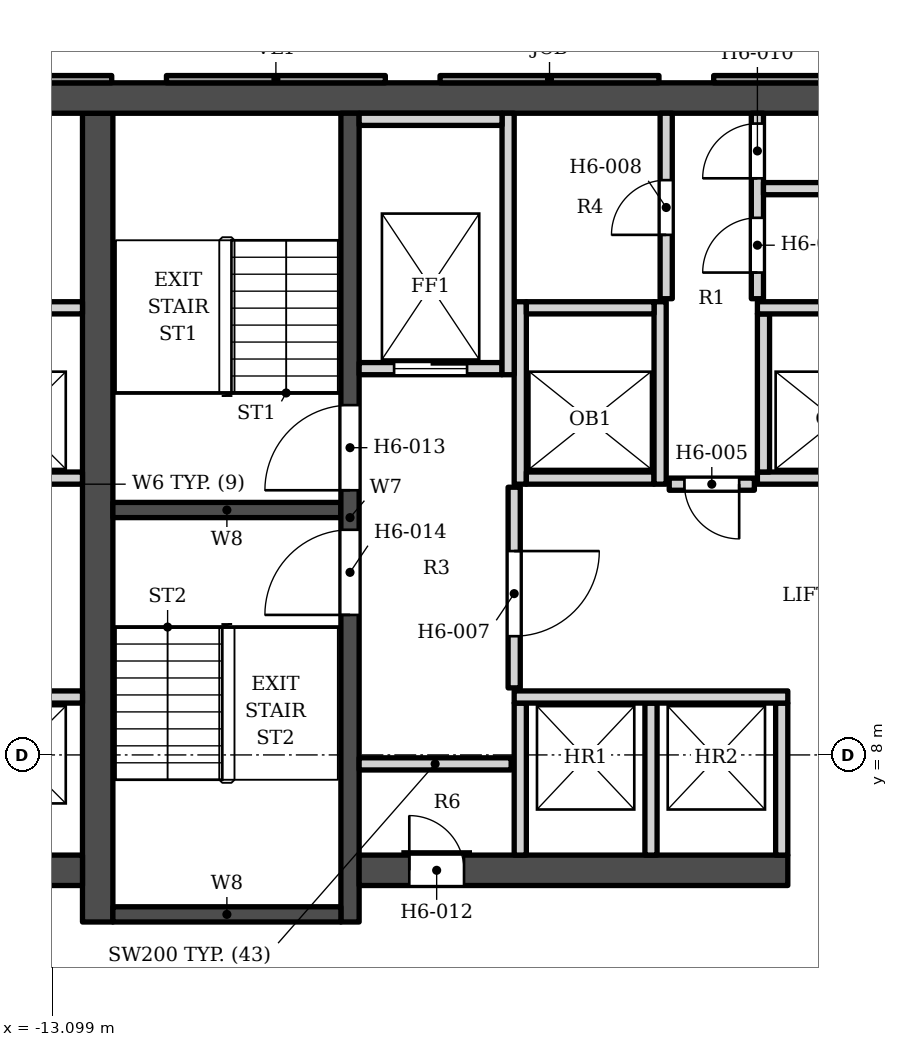
"""IFC4 building model, lengths in metres.
Left out: names, types, materials, properties, quantities, classifications, styles, units other than length and angle.
Written with IfcOpenShell. Run it as: python <this file> out.ifc"""

import sys

from ifc_helpers import new_model, si_unit, direction, frame, frame_2d, origin, place, context, subcontext, project, spatial, polyline, rectangle, outline, extrude, element, fill, save


model = new_model("IFC4")
c1 = context("Model", 3, precision=1e-05, world=origin(), true_north=direction((0.0, 1.0)))
c2 = subcontext(c1, "Body", "Model", "MODEL_VIEW")
j1 = project(units=[si_unit("LENGTHUNIT", "METRE"), si_unit("PLANEANGLEUNIT", "RADIAN")], contexts=[c1])
p1 = place(None, origin())
s1 = spatial("IfcSite", under=j1, at=p1, CompositionType="ELEMENT")
p2 = place(p1, origin())
s2 = spatial("IfcBuilding", under=s1, at=p2, CompositionType="ELEMENT")
p3 = place(p2, frame((0.0, 0.0, 102.0)))
s3 = spatial("IfcBuildingStorey", under=s2, at=p3, CompositionType="ELEMENT", Elevation=102.0)
p4 = place(p3, frame((-16.9, 18.802, 0.0), z_axis=(0.0, 0.0, 1.0), x_axis=(1.0, 0.0, 0.0)))
e1 = element("IfcWall", 1, at=p4, inside=s3, PredefinedType="SHEAR", context=c2, shape_type="SweptSolid", body=[
    extrude(rectangle(XDim=33.8, YDim=0.5, at=frame_2d((16.9, 0.0))), origin(), (0.0, 0.0, 1.0), 3.4),
])
p5 = place(p3, frame((-12.35, 5.253, 0.0), z_axis=(0.0, 0.0, 1.0), x_axis=(0.0, 1.0, 0.0)))
e2 = element("IfcWall", 2, at=p5, inside=s3, PredefinedType="SHEAR", context=c2, shape_type="SweptSolid", body=[
    extrude(rectangle(XDim=13.3, YDim=0.5, at=frame_2d((6.65, 0.0))), origin(), (0.0, 0.0, 1.0), 3.4),
])
p6 = place(p3, frame((-8.2, 5.253, 0.0), z_axis=(0.0, 0.0, 1.0), x_axis=(0.0, 1.0, 0.0)))
e3 = element("IfcWall", 3, at=p6, inside=s3, PredefinedType="SHEAR", context=c2, shape_type="SweptSolid", body=[
    extrude(rectangle(XDim=13.3, YDim=0.3, at=frame_2d((6.65, 0.0))), origin(), (0.0, 0.0, 1.0), 3.4),
])
p7 = place(p6, frame((7.1, 0.0, 0.0)))
e4 = element("IfcOpeningElement", 4, at=p7, cuts=e3, PredefinedType="OPENING", context=c2, shape_type="SweptSolid", body=[
    extrude(rectangle(XDim=1.4, YDim=2.1, at=frame_2d((0.7, 1.05))), frame((0.0, 0.16, 0.0), z_axis=(0.0, -1.0, 0.0), x_axis=(1.0, 0.0, 0.0)), (0.0, 0.0, 1.0), 0.32),
])
p8 = place(p6, frame((5.05, 0.0, 0.0)))
e5 = element("IfcOpeningElement", 5, at=p8, cuts=e3, PredefinedType="OPENING", context=c2, shape_type="SweptSolid", body=[
    extrude(rectangle(XDim=1.4, YDim=2.1, at=frame_2d((0.7, 1.05))), frame((0.0, 0.16, 0.0), z_axis=(0.0, -1.0, 0.0), x_axis=(1.0, 0.0, 0.0)), (0.0, 0.0, 1.0), 0.32),
])
for number, where, z_axis, x_axis in (
    (6, (-12.1, 12.028, 0.0), (0.0, 0.0, 1.0), (1.0, 0.0, 0.0)),
    (7, (-12.1, 5.378, 0.0), (0.0, 0.0, 1.0), (1.0, 0.0, 0.0)),
):
    element("IfcWall", number, at=place(p3, frame(where, z_axis=z_axis, x_axis=x_axis)), inside=s3, PredefinedType="SHEAR", context=c2, shape_type="SweptSolid", body=[
        extrude(rectangle(XDim=3.75, YDim=0.25, at=frame_2d((1.875, 0.0))), origin(), (0.0, 0.0, 1.0), 3.4),
    ])
p9 = place(p3, frame((-8.05, 6.103, 0.0), z_axis=(0.0, 0.0, 1.0), x_axis=(1.0, 0.0, 0.0)))
e8 = element("IfcWall", 8, at=p9, inside=s3, PredefinedType="SHEAR", context=c2, shape_type="SweptSolid", body=[
    extrude(rectangle(XDim=7.05, YDim=0.5, at=frame_2d((3.525, 0.0))), origin(), (0.0, 0.0, 1.0), 3.4),
])
p10 = place(p9, frame((0.825, 0.0, 0.0)))
e9 = element("IfcOpeningElement", 9, at=p10, cuts=e8, PredefinedType="OPENING", context=c2, shape_type="SweptSolid", body=[
    extrude(rectangle(XDim=0.9, YDim=2.1, at=frame_2d((0.45, 1.05))), frame((0.0, 0.26, 0.0), z_axis=(0.0, -1.0, 0.0), x_axis=(1.0, 0.0, 0.0)), (0.0, 0.0, 1.0), 0.52),
])
p11 = place(p3, frame((-12.6, 6.103, 0.0), z_axis=(0.0, 0.0, 1.0), x_axis=(-1.0, 0.0, 0.0)))
e10 = element("IfcWall", 10, at=p11, inside=s3, PredefinedType="SHEAR", context=c2, shape_type="SweptSolid", body=[
    extrude(rectangle(XDim=4.3, YDim=0.5, at=frame_2d((2.15, 0.0))), origin(), (0.0, 0.0, 1.0), 3.4),
])
p12 = place(p3, origin())
e11 = element("IfcWall", 11, at=p12, inside=s3, PredefinedType="ELEMENTEDWALL", context=c2, shape_type="SweptSolid", body=[
    extrude(outline(polyline([(-2.219, 19.173), (-2.219, 19.052), (1.381, 19.052), (1.381, 19.173), (-2.219, 19.173)])), origin(), (0.0, 0.0, 1.0), 2.65),
])
p13 = place(p3, origin())
e12 = element("IfcWall", 12, at=p13, inside=s3, PredefinedType="SOLIDWALL", context=c2, shape_type="SweptSolid", body=[
    extrude(outline(polyline([(-6.719, 19.173), (-6.719, 19.052), (-3.119, 19.052), (-3.119, 19.173), (-6.719, 19.173)])), origin(), (0.0, 0.0, 1.0), 2.65),
])
p14 = place(p3, origin())
e13 = element("IfcWall", 13, at=p14, inside=s3, PredefinedType="ELEMENTEDWALL", context=c2, shape_type="SweptSolid", body=[
    extrude(outline(polyline([(-11.219, 19.173), (-11.219, 19.052), (-7.619, 19.052), (-7.619, 19.173), (-11.219, 19.173)])), origin(), (0.0, 0.0, 1.0), 2.65),
])
p15 = place(p3, origin())
e14 = element("IfcWall", 14, at=p15, inside=s3, PredefinedType="SOLIDWALL", context=c2, shape_type="SweptSolid", body=[
    extrude(outline(polyline([(-15.719, 19.173), (-15.719, 19.052), (-12.119, 19.052), (-12.119, 19.173), (-15.719, 19.173)])), origin(), (0.0, 0.0, 1.0), 2.65),
])
for number, where, z_axis, x_axis in (
    (15, (-5.4, 6.353, 0.0), (0.0, 0.0, 1.0), (0.0, 1.0, 0.0)),
    (16, (-3.25, 6.353, 0.0), (0.0, 0.0, 1.0), (0.0, 1.0, 0.0)),
    (17, (-1.1, 6.353, 0.0), (0.0, 0.0, 1.0), (0.0, 1.0, 0.0)),
    (18, (-8.05, 7.853, 0.0), (0.0, 0.0, 1.0), (1.0, 0.0, 0.0)),
):
    element("IfcWall", number, at=place(p3, frame(where, z_axis=z_axis, x_axis=x_axis)), inside=s3, PredefinedType="SOLIDWALL", context=c2, shape_type="SweptSolid", body=[
        extrude(rectangle(XDim=2.5, YDim=0.2, at=frame_2d((1.25, 0.0))), origin(), (0.0, 0.0, 1.0), 3.23),
    ])
p16 = place(p3, frame((-16.9, 8.953, 0.0), z_axis=(0.0, 0.0, 1.0), x_axis=(1.0, 0.0, 0.0)))
e19 = element("IfcWall", 19, at=p16, inside=s3, PredefinedType="SOLIDWALL", context=c2, shape_type="SweptSolid", body=[
    extrude(rectangle(XDim=4.3, YDim=0.2, at=frame_2d((2.15, 0.0))), origin(), (0.0, 0.0, 1.0), 3.23),
])
p17 = place(p16, frame((2.675, 0.0, 0.0)))
e20 = element("IfcOpeningElement", 20, at=p17, cuts=e19, PredefinedType="OPENING", context=c2, shape_type="SweptSolid", body=[
    extrude(rectangle(XDim=1.1, YDim=2.1, at=frame_2d((0.55, 1.05))), frame((0.0, 0.11, 0.0), z_axis=(0.0, -1.0, 0.0), x_axis=(1.0, 0.0, 0.0)), (0.0, 0.0, 1.0), 0.22),
])
p18 = place(p16, frame((0.425, 0.0, 0.0)))
e21 = element("IfcOpeningElement", 21, at=p18, cuts=e19, PredefinedType="OPENING", context=c2, shape_type="SweptSolid", body=[
    extrude(rectangle(XDim=1.1, YDim=2.1, at=frame_2d((0.55, 1.05))), frame((0.0, 0.11, 0.0), z_axis=(0.0, -1.0, 0.0), x_axis=(1.0, 0.0, 0.0)), (0.0, 0.0, 1.0), 0.22),
])
p19 = place(p3, frame((-5.5, 8.953, 0.0), z_axis=(0.0, 0.0, 1.0), x_axis=(1.0, 0.0, 0.0)))
e22 = element("IfcWall", 22, at=p19, inside=s3, PredefinedType="SOLIDWALL", context=c2, shape_type="SweptSolid", body=[
    extrude(rectangle(XDim=4.5, YDim=0.2, at=frame_2d((2.25, 0.0))), origin(), (0.0, 0.0, 1.0), 3.23),
])
p20 = place(p3, frame((-5.5, 9.103, 0.0), z_axis=(0.0, 0.0, 1.0), x_axis=(0.0, 1.0, 0.0)))
e23 = element("IfcWall", 23, at=p20, inside=s3, PredefinedType="SOLIDWALL", context=c2, shape_type="SweptSolid", body=[
    extrude(rectangle(XDim=3.3, YDim=0.2, at=frame_2d((1.65, 0.0))), origin(), (0.0, 0.0, 1.0), 3.23),
])
p21 = place(p20, frame((0.85, 0.0, 0.0)))
e24 = element("IfcOpeningElement", 24, at=p21, cuts=e23, PredefinedType="OPENING", context=c2, shape_type="SweptSolid", body=[
    extrude(rectangle(XDim=1.4, YDim=2.1, at=frame_2d((0.7, 1.05))), frame((0.0, 0.11, 0.0), z_axis=(0.0, -1.0, 0.0), x_axis=(1.0, 0.0, 0.0)), (0.0, 0.0, 1.0), 0.22),
])
p22 = place(p3, frame((-2.95, 12.453, 0.0), z_axis=(0.0, 0.0, 1.0), x_axis=(1.0, 0.0, 0.0)))
e25 = element("IfcWall", 25, at=p22, inside=s3, PredefinedType="SOLIDWALL", context=c2, shape_type="SweptSolid", body=[
    extrude(rectangle(XDim=1.4, YDim=0.2, at=frame_2d((0.7, 0.0))), origin(), (0.0, 0.0, 1.0), 3.23),
])
p23 = place(p22, frame((0.25, 0.0, 0.0)))
e26 = element("IfcOpeningElement", 26, at=p23, cuts=e25, PredefinedType="OPENING", context=c2, shape_type="SweptSolid", body=[
    extrude(rectangle(XDim=0.9, YDim=2.1, at=frame_2d((0.45, 1.05))), frame((0.0, 0.11, 0.0), z_axis=(0.0, -1.0, 0.0), x_axis=(1.0, 0.0, 0.0)), (0.0, 0.0, 1.0), 0.22),
])
p24 = place(p3, frame((-16.9, 12.552, 0.0), z_axis=(0.0, 0.0, 1.0), x_axis=(1.0, 0.0, 0.0)))
e27 = element("IfcWall", 27, at=p24, inside=s3, PredefinedType="SOLIDWALL", context=c2, shape_type="SweptSolid", body=[
    extrude(rectangle(XDim=4.3, YDim=0.2, at=frame_2d((2.15, 0.0))), origin(), (0.0, 0.0, 1.0), 3.23),
])
p25 = place(p24, frame((2.675, 0.0, 0.0)))
e28 = element("IfcOpeningElement", 28, at=p25, cuts=e27, PredefinedType="OPENING", context=c2, shape_type="SweptSolid", body=[
    extrude(rectangle(XDim=1.1, YDim=2.1, at=frame_2d((0.55, 1.05))), frame((0.0, 0.11, 0.0), z_axis=(0.0, -1.0, 0.0), x_axis=(1.0, 0.0, 0.0)), (0.0, 0.0, 1.0), 0.22),
])
p26 = place(p24, frame((0.425, 0.0, 0.0)))
e29 = element("IfcOpeningElement", 29, at=p26, cuts=e27, PredefinedType="OPENING", context=c2, shape_type="SweptSolid", body=[
    extrude(rectangle(XDim=1.1, YDim=2.1, at=frame_2d((0.55, 1.05))), frame((0.0, 0.11, 0.0), z_axis=(0.0, -1.0, 0.0), x_axis=(1.0, 0.0, 0.0)), (0.0, 0.0, 1.0), 0.22),
])
p27 = place(p3, frame((-5.4, 12.453, 0.0), z_axis=(0.0, 0.0, 1.0), x_axis=(0.0, 1.0, 0.0)))
e30 = element("IfcWall", 30, at=p27, inside=s3, PredefinedType="SOLIDWALL", context=c2, shape_type="SweptSolid", body=[
    extrude(rectangle(XDim=3.0, YDim=0.2, at=frame_2d((1.5, 0.0))), origin(), (0.0, 0.0, 1.0), 3.23),
])
p28 = place(p3, frame((-5.3, 12.552, 0.0), z_axis=(0.0, 0.0, 1.0), x_axis=(1.0, 0.0, 0.0)))
e31 = element("IfcWall", 31, at=p28, inside=s3, PredefinedType="SOLIDWALL", context=c2, shape_type="SweptSolid", body=[
    extrude(rectangle(XDim=2.1, YDim=0.2, at=frame_2d((1.05, 0.0))), origin(), (0.0, 0.0, 1.0), 3.23),
])
p29 = place(p3, frame((-3.1, 12.453, 0.0), z_axis=(0.0, 0.0, 1.0), x_axis=(0.0, 1.0, 0.0)))
e32 = element("IfcWall", 32, at=p29, inside=s3, PredefinedType="SOLIDWALL", context=c2, shape_type="SweptSolid", body=[
    extrude(rectangle(XDim=3.0, YDim=0.2, at=frame_2d((1.5, 0.0))), origin(), (0.0, 0.0, 1.0), 3.23),
])
p30 = place(p3, frame((-1.5, 12.552, 0.0), z_axis=(0.0, 0.0, 1.0), x_axis=(1.0, 0.0, 0.0)))
e33 = element("IfcWall", 33, at=p30, inside=s3, PredefinedType="SOLIDWALL", context=c2, shape_type="SweptSolid", body=[
    extrude(rectangle(XDim=7.0, YDim=0.2, at=frame_2d((3.5, 0.0))), origin(), (0.0, 0.0, 1.0), 3.23),
])
p31 = place(p3, frame((-1.4, 12.653, 0.0), z_axis=(0.0, 0.0, 1.0), x_axis=(0.0, 1.0, 0.0)))
e34 = element("IfcWall", 34, at=p31, inside=s3, PredefinedType="SOLIDWALL", context=c2, shape_type="SweptSolid", body=[
    extrude(rectangle(XDim=2.6, YDim=0.2, at=frame_2d((1.3, 0.0))), origin(), (0.0, 0.0, 1.0), 3.23),
])
p32 = place(p3, frame((-8.05, 14.353, 0.0), z_axis=(0.0, 0.0, 1.0), x_axis=(1.0, 0.0, 0.0)))
e35 = element("IfcWall", 35, at=p32, inside=s3, PredefinedType="SOLIDWALL", context=c2, shape_type="SweptSolid", body=[
    extrude(rectangle(XDim=2.35, YDim=0.2, at=frame_2d((1.175, 0.0))), origin(), (0.0, 0.0, 1.0), 3.23),
])
p33 = place(p32, frame((0.575, 0.0, 0.0)))
e36 = element("IfcOpeningElement", 36, at=p33, cuts=e35, PredefinedType="OPENING", context=c2, shape_type="SweptSolid", body=[
    extrude(rectangle(XDim=1.2, YDim=2.1, at=frame_2d((0.6, 1.05))), frame((0.0, 0.11, 0.0), z_axis=(0.0, -1.0, 0.0), x_axis=(1.0, 0.0, 0.0)), (0.0, 0.0, 1.0), 0.22),
])
for number, where, z_axis, x_axis in (
    (37, (-5.6, 14.253, 0.0), (0.0, 0.0, 1.0), (0.0, 1.0, 0.0)),
    (38, (-16.9, 15.353, 0.0), (0.0, 0.0, 1.0), (1.0, 0.0, 0.0)),
):
    element("IfcWall", number, at=place(p3, frame(where, z_axis=z_axis, x_axis=x_axis)), inside=s3, PredefinedType="SOLIDWALL", context=c2, shape_type="SweptSolid", body=[
        extrude(rectangle(XDim=4.3, YDim=0.2, at=frame_2d((2.15, 0.0))), origin(), (0.0, 0.0, 1.0), 3.23),
    ])
p34 = place(p3, frame((-5.3, 15.353, 0.0), z_axis=(0.0, 0.0, 1.0), x_axis=(1.0, 0.0, 0.0)))
e39 = element("IfcWall", 39, at=p34, inside=s3, PredefinedType="SOLIDWALL", context=c2, shape_type="SweptSolid", body=[
    extrude(rectangle(XDim=2.1, YDim=0.2, at=frame_2d((1.05, 0.0))), origin(), (0.0, 0.0, 1.0), 3.23),
])
p35 = place(p3, frame((-1.5, 15.353, 0.0), z_axis=(0.0, 0.0, 1.0), x_axis=(1.0, 0.0, 0.0)))
e40 = element("IfcWall", 40, at=p35, inside=s3, PredefinedType="SOLIDWALL", context=c2, shape_type="SweptSolid", body=[
    extrude(rectangle(XDim=7.2, YDim=0.2, at=frame_2d((3.6, 0.0))), origin(), (0.0, 0.0, 1.0), 3.23),
])
p36 = place(p3, frame((-3.0, 15.503, 0.0), z_axis=(0.0, 0.0, 1.0), x_axis=(0.0, 1.0, 0.0)))
e41 = element("IfcWall", 41, at=p36, inside=s3, PredefinedType="SOLIDWALL", context=c2, shape_type="SweptSolid", body=[
    extrude(rectangle(XDim=3.05, YDim=0.2, at=frame_2d((1.525, 0.0))), origin(), (0.0, 0.0, 1.0), 3.23),
])
p37 = place(p36, frame((1.05, 0.0, 0.0)))
e42 = element("IfcOpeningElement", 42, at=p37, cuts=e41, PredefinedType="OPENING", context=c2, shape_type="SweptSolid", body=[
    extrude(rectangle(XDim=0.9, YDim=2.1, at=frame_2d((0.45, 1.05))), frame((0.0, 0.11, 0.0), z_axis=(0.0, -1.0, 0.0), x_axis=(1.0, 0.0, 0.0)), (0.0, 0.0, 1.0), 0.22),
])
p38 = place(p3, frame((-1.5, 15.503, 0.0), z_axis=(0.0, 0.0, 1.0), x_axis=(0.0, 1.0, 0.0)))
e43 = element("IfcWall", 43, at=p38, inside=s3, PredefinedType="SOLIDWALL", context=c2, shape_type="SweptSolid", body=[
    extrude(rectangle(XDim=3.05, YDim=0.2, at=frame_2d((1.525, 0.0))), origin(), (0.0, 0.0, 1.0), 3.23),
])
p39 = place(p38, frame((0.43, 0.0, 0.0)))
e44 = element("IfcOpeningElement", 44, at=p39, cuts=e43, PredefinedType="OPENING", context=c2, shape_type="SweptSolid", body=[
    extrude(rectangle(XDim=0.9, YDim=2.1, at=frame_2d((0.45, 1.05))), frame((0.0, 0.11, 0.0), z_axis=(0.0, -1.0, 0.0), x_axis=(1.0, 0.0, 0.0)), (0.0, 0.0, 1.0), 0.22),
])
p40 = place(p38, frame((1.98, 0.0, 0.0)))
e45 = element("IfcOpeningElement", 45, at=p40, cuts=e43, PredefinedType="OPENING", context=c2, shape_type="SweptSolid", body=[
    extrude(rectangle(XDim=0.9, YDim=2.1, at=frame_2d((0.45, 1.05))), frame((0.0, 0.11, 0.0), z_axis=(0.0, -1.0, 0.0), x_axis=(1.0, 0.0, 0.0)), (0.0, 0.0, 1.0), 0.22),
])
p41 = place(p3, frame((-1.4, 17.312, 0.0), z_axis=(0.0, 0.0, 1.0), x_axis=(1.0, 0.0, 0.0)))
e46 = element("IfcWall", 46, at=p41, inside=s3, PredefinedType="SOLIDWALL", context=c2, shape_type="SweptSolid", body=[
    extrude(rectangle(XDim=6.85, YDim=0.2, at=frame_2d((3.425, 0.0))), origin(), (0.0, 0.0, 1.0), 3.23),
])
p42 = place(p3, frame((-8.05, 18.453, 0.0), z_axis=(0.0, 0.0, 1.0), x_axis=(1.0, 0.0, 0.0)))
e47 = element("IfcWall", 47, at=p42, inside=s3, PredefinedType="SOLIDWALL", context=c2, shape_type="SweptSolid", body=[
    extrude(rectangle(XDim=2.35, YDim=0.2, at=frame_2d((1.175, 0.0))), origin(), (0.0, 0.0, 1.0), 3.23),
])
p43 = place(p33, origin())
e48 = element("IfcDoor", 48, at=p43, inside=s3, OperationType="DOUBLE_DOOR_SLIDING", PredefinedType="DOOR", context=c2, shape_type="SweptSolid", body=[
    extrude(rectangle(XDim=1.2, YDim=2.1, at=frame_2d((0.6, 1.05))), frame((0.0, 0.025, 0.0), z_axis=(0.0, -1.0, 0.0), x_axis=(1.0, 0.0, 0.0)), (0.0, 0.0, 1.0), 0.05),
])
fill(e36, e48)
p44 = place(p7, origin())
e49 = element("IfcDoor", 49, at=p44, inside=s3, OperationType="SINGLE_SWING_LEFT", PredefinedType="DOOR", context=c2, shape_type="SweptSolid", body=[
    extrude(rectangle(XDim=1.4, YDim=2.1, at=frame_2d((0.7, 1.05))), frame((0.0, 0.025, 0.0), z_axis=(0.0, -1.0, 0.0), x_axis=(1.0, 0.0, 0.0)), (0.0, 0.0, 1.0), 0.05),
])
fill(e4, e49)
p45 = place(p8, origin())
e50 = element("IfcDoor", 50, at=p45, inside=s3, OperationType="SINGLE_SWING_LEFT", PredefinedType="DOOR", context=c2, shape_type="SweptSolid", body=[
    extrude(rectangle(XDim=1.4, YDim=2.1, at=frame_2d((0.7, 1.05))), frame((0.0, 0.025, 0.0), z_axis=(0.0, -1.0, 0.0), x_axis=(1.0, 0.0, 0.0)), (0.0, 0.0, 1.0), 0.05),
])
fill(e5, e50)
p46 = place(p23, origin())
e51 = element("IfcDoor", 51, at=p46, inside=s3, OperationType="SINGLE_SWING_RIGHT", PredefinedType="DOOR", context=c2, shape_type="SweptSolid", body=[
    extrude(rectangle(XDim=0.9, YDim=2.1, at=frame_2d((0.45, 1.05))), frame((0.0, 0.025, 0.0), z_axis=(0.0, -1.0, 0.0), x_axis=(1.0, 0.0, 0.0)), (0.0, 0.0, 1.0), 0.05),
])
fill(e26, e51)
p47 = place(p21, origin())
e52 = element("IfcDoor", 52, at=p47, inside=s3, OperationType="SINGLE_SWING_RIGHT", PredefinedType="DOOR", context=c2, shape_type="SweptSolid", body=[
    extrude(rectangle(XDim=1.4, YDim=2.1, at=frame_2d((0.7, 1.05))), frame((0.0, 0.025, 0.0), z_axis=(0.0, -1.0, 0.0), x_axis=(1.0, 0.0, 0.0)), (0.0, 0.0, 1.0), 0.05),
])
fill(e24, e52)
p48 = place(p37, origin())
e53 = element("IfcDoor", 53, at=p48, inside=s3, OperationType="SINGLE_SWING_LEFT", PredefinedType="DOOR", context=c2, shape_type="SweptSolid", body=[
    extrude(rectangle(XDim=0.9, YDim=2.1, at=frame_2d((0.45, 1.05))), frame((0.0, 0.025, 0.0), z_axis=(0.0, -1.0, 0.0), x_axis=(1.0, 0.0, 0.0)), (0.0, 0.0, 1.0), 0.05),
])
fill(e42, e53)
p49 = place(p39, origin())
e54 = element("IfcDoor", 54, at=p49, inside=s3, OperationType="SINGLE_SWING_LEFT", PredefinedType="DOOR", context=c2, shape_type="SweptSolid", body=[
    extrude(rectangle(XDim=0.9, YDim=2.1, at=frame_2d((0.45, 1.05))), frame((0.0, 0.025, 0.0), z_axis=(0.0, -1.0, 0.0), x_axis=(1.0, 0.0, 0.0)), (0.0, 0.0, 1.0), 0.05),
])
fill(e44, e54)
p50 = place(p40, origin())
e55 = element("IfcDoor", 55, at=p50, inside=s3, OperationType="SINGLE_SWING_LEFT", PredefinedType="DOOR", context=c2, shape_type="SweptSolid", body=[
    extrude(rectangle(XDim=0.9, YDim=2.1, at=frame_2d((0.45, 1.05))), frame((0.0, 0.025, 0.0), z_axis=(0.0, -1.0, 0.0), x_axis=(1.0, 0.0, 0.0)), (0.0, 0.0, 1.0), 0.05),
])
fill(e45, e55)
p51 = place(p10, origin())
e56 = element("IfcDoor", 56, at=p51, inside=s3, OperationType="SINGLE_SWING_LEFT", PredefinedType="DOOR", context=c2, shape_type="SweptSolid", body=[
    extrude(rectangle(XDim=0.9, YDim=2.1, at=frame_2d((0.45, 1.05))), frame((0.0, 0.025, 0.0), z_axis=(0.0, -1.0, 0.0), x_axis=(1.0, 0.0, 0.0)), (0.0, 0.0, 1.0), 0.05),
])
fill(e9, e56)
save(model, sys.argv[1])
